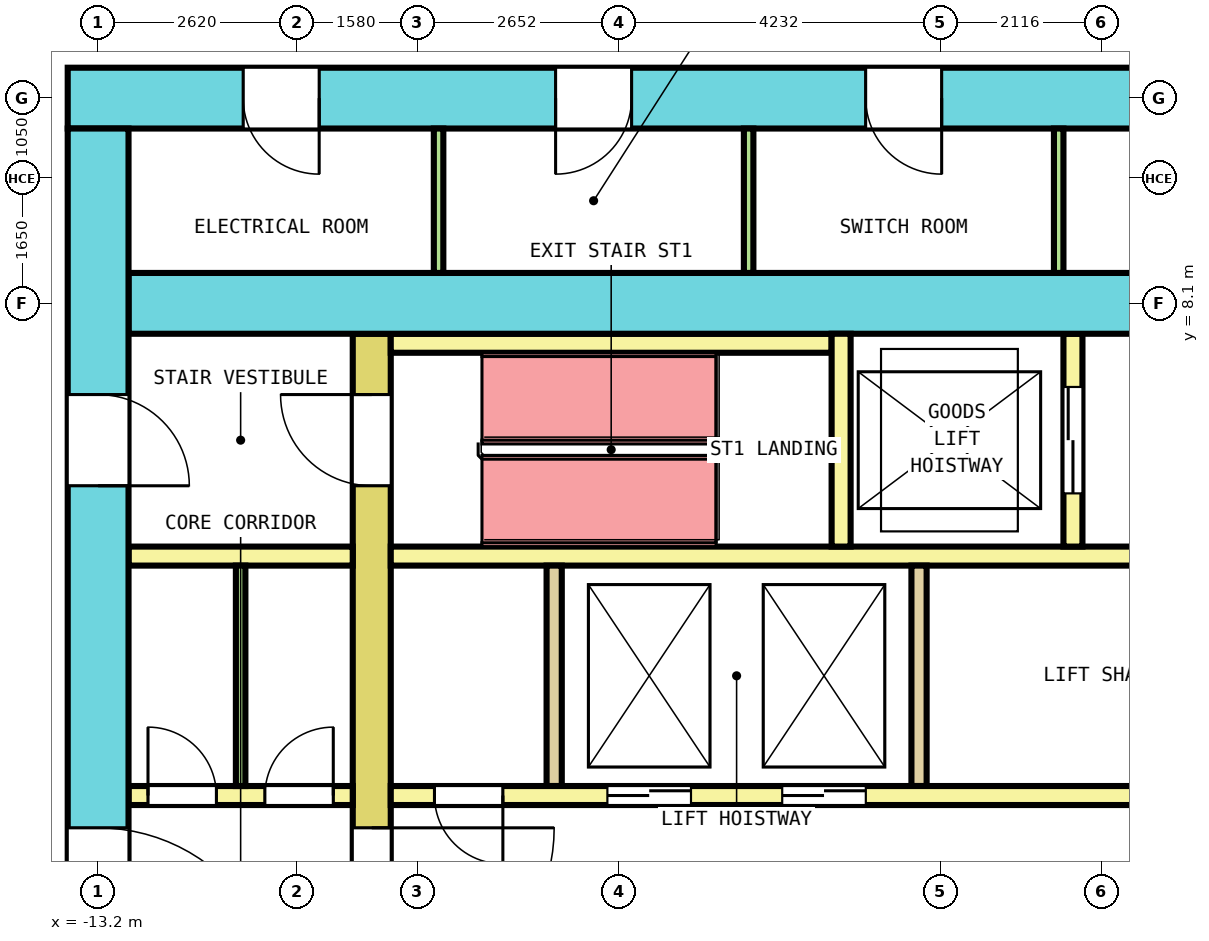
"""IFC4 building model, lengths in metres.
Left out: names, types, materials, properties, quantities, classifications, styles, units other than length and angle.
Written with IfcOpenShell. Run it as: python <this file> out.ifc"""

import sys

from ifc_helpers import new_model, si_unit, direction, frame, frame_2d, origin, place, context, subcontext, project, spatial, rectangle, extrude, element, fill, save


model = new_model("IFC4")
c1 = context("Model", 3, precision=1e-05, world=origin(), true_north=direction((0.0, 1.0)))
c2 = subcontext(c1, "Body", "Model", "MODEL_VIEW")
j1 = project(units=[si_unit("LENGTHUNIT", "METRE"), si_unit("PLANEANGLEUNIT", "RADIAN")], contexts=[c1])
p1 = place(None, origin())
s1 = spatial("IfcSite", under=j1, at=p1, CompositionType="ELEMENT")
p2 = place(p1, origin())
s2 = spatial("IfcBuilding", under=s1, at=p2, CompositionType="ELEMENT")
p3 = place(p2, frame((0.0, 0.0, 117.6)))
s3 = spatial("IfcBuildingStorey", under=s2, at=p3, CompositionType="ELEMENT", Elevation=117.6)
p4 = place(p3, frame((-13.6, 10.8, 0.0), z_axis=(0.0, 0.0, 1.0), x_axis=(1.0, 0.0, 0.0)))
e1 = element("IfcWall", 1, at=p4, inside=s3, PredefinedType="SHEAR", context=c2, shape_type="SweptSolid", body=[
    extrude(rectangle(XDim=27.2, YDim=0.8, at=frame_2d((13.6, 0.0))), origin(), (0.0, 0.0, 1.0), 4.1),
])
p5 = place(p4, frame((2.308, 0.0, 0.0)))
e2 = element("IfcOpeningElement", 2, at=p5, cuts=e1, PredefinedType="OPENING", context=c2, shape_type="SweptSolid", body=[
    extrude(rectangle(XDim=1.0, YDim=2.1, at=frame_2d((0.5, 1.05))), frame((0.0, 0.41, 0.0), z_axis=(0.0, -1.0, 0.0), x_axis=(1.0, 0.0, 0.0)), (0.0, 0.0, 1.0), 0.82),
])
p6 = place(p4, frame((6.419, 0.0, 0.0)))
e3 = element("IfcOpeningElement", 3, at=p6, cuts=e1, PredefinedType="OPENING", context=c2, shape_type="SweptSolid", body=[
    extrude(rectangle(XDim=1.0, YDim=2.1, at=frame_2d((0.5, 1.05))), frame((0.0, 0.41, 0.0), z_axis=(0.0, -1.0, 0.0), x_axis=(1.0, 0.0, 0.0)), (0.0, 0.0, 1.0), 0.82),
])
p7 = place(p4, frame((10.498, 0.0, 0.0)))
e4 = element("IfcOpeningElement", 4, at=p7, cuts=e1, PredefinedType="OPENING", context=c2, shape_type="SweptSolid", body=[
    extrude(rectangle(XDim=1.0, YDim=2.1, at=frame_2d((0.5, 1.05))), frame((0.0, 0.41, 0.0), z_axis=(0.0, -1.0, 0.0), x_axis=(1.0, 0.0, 0.0)), (0.0, 0.0, 1.0), 0.82),
])
p8 = place(p4, frame((18.035, 0.0, 0.0)))
e5 = element("IfcOpeningElement", 5, at=p8, cuts=e1, PredefinedType="OPENING", context=c2, shape_type="SweptSolid", body=[
    extrude(rectangle(XDim=1.0, YDim=2.1, at=frame_2d((0.5, 1.05))), frame((0.0, 0.41, 0.0), z_axis=(0.0, -1.0, 0.0), x_axis=(1.0, 0.0, 0.0)), (0.0, 0.0, 1.0), 0.82),
])
p9 = place(p4, frame((21.181, 0.0, 0.0)))
e6 = element("IfcOpeningElement", 6, at=p9, cuts=e1, PredefinedType="OPENING", context=c2, shape_type="SweptSolid", body=[
    extrude(rectangle(XDim=1.0, YDim=2.1, at=frame_2d((0.5, 1.05))), frame((0.0, 0.41, 0.0), z_axis=(0.0, -1.0, 0.0), x_axis=(1.0, 0.0, 0.0)), (0.0, 0.0, 1.0), 0.82),
])
p10 = place(p4, frame((24.358, 0.0, 0.0)))
e7 = element("IfcOpeningElement", 7, at=p10, cuts=e1, PredefinedType="OPENING", context=c2, shape_type="SweptSolid", body=[
    extrude(rectangle(XDim=1.0, YDim=2.1, at=frame_2d((0.5, 1.05))), frame((0.0, 0.41, 0.0), z_axis=(0.0, -1.0, 0.0), x_axis=(1.0, 0.0, 0.0)), (0.0, 0.0, 1.0), 0.82),
])
p11 = place(p4, frame((14.525, 0.0, 0.0)))
e8 = element("IfcOpeningElement", 8, at=p11, cuts=e1, PredefinedType="OPENING", context=c2, shape_type="SweptSolid", body=[
    extrude(rectangle(XDim=1.4, YDim=2.1, at=frame_2d((0.7, 1.05))), frame((0.0, 0.41, 0.0), z_axis=(0.0, -1.0, 0.0), x_axis=(1.0, 0.0, 0.0)), (0.0, 0.0, 1.0), 0.82),
])
p12 = place(p3, frame((-13.2, -10.4, 0.0), z_axis=(0.0, 0.0, 1.0), x_axis=(0.0, 1.0, 0.0)))
e9 = element("IfcWall", 9, at=p12, inside=s3, PredefinedType="SHEAR", context=c2, shape_type="SweptSolid", body=[
    extrude(rectangle(XDim=20.8, YDim=0.8, at=frame_2d((10.4, 0.0))), origin(), (0.0, 0.0, 1.0), 4.1),
])
p13 = place(p12, frame((9.2, 0.0, 0.0)))
e10 = element("IfcOpeningElement", 10, at=p13, cuts=e9, PredefinedType="OPENING", context=c2, shape_type="SweptSolid", body=[
    extrude(rectangle(XDim=2.4, YDim=2.1, at=frame_2d((1.2, 1.05))), frame((0.0, 0.41, 0.0), z_axis=(0.0, -1.0, 0.0), x_axis=(1.0, 0.0, 0.0)), (0.0, 0.0, 1.0), 0.82),
])
p14 = place(p12, frame((16.1, 0.0, 0.0)))
e11 = element("IfcOpeningElement", 11, at=p14, cuts=e9, PredefinedType="OPENING", context=c2, shape_type="SweptSolid", body=[
    extrude(rectangle(XDim=1.2, YDim=2.1, at=frame_2d((0.6, 1.05))), frame((0.0, 0.41, 0.0), z_axis=(0.0, -1.0, 0.0), x_axis=(1.0, 0.0, 0.0)), (0.0, 0.0, 1.0), 0.82),
])
p15 = place(p12, frame((3.5, 0.0, 0.0)))
e12 = element("IfcOpeningElement", 12, at=p15, cuts=e9, PredefinedType="OPENING", context=c2, shape_type="SweptSolid", body=[
    extrude(rectangle(XDim=1.2, YDim=2.1, at=frame_2d((0.6, 1.05))), frame((0.0, 0.41, 0.0), z_axis=(0.0, -1.0, 0.0), x_axis=(1.0, 0.0, 0.0)), (0.0, 0.0, 1.0), 0.82),
])
p16 = place(p3, frame((-12.8, 8.1, 0.0), z_axis=(0.0, 0.0, 1.0), x_axis=(1.0, 0.0, 0.0)))
e13 = element("IfcWall", 13, at=p16, inside=s3, PredefinedType="SHEAR", context=c2, shape_type="SweptSolid", body=[
    extrude(rectangle(XDim=25.6, YDim=0.8, at=frame_2d((12.8, 0.0))), origin(), (0.0, 0.0, 1.0), 4.1),
])
p17 = place(p16, frame((13.725, 0.0, 0.0)))
e14 = element("IfcOpeningElement", 14, at=p17, cuts=e13, PredefinedType="OPENING", context=c2, shape_type="SweptSolid", body=[
    extrude(rectangle(XDim=1.4, YDim=2.1, at=frame_2d((0.7, 1.05))), frame((0.0, 0.41, 0.0), z_axis=(0.0, -1.0, 0.0), x_axis=(1.0, 0.0, 0.0)), (0.0, 0.0, 1.0), 0.82),
])
p18 = place(p3, frame((-9.6, -7.7, 0.0), z_axis=(0.0, 0.0, 1.0), x_axis=(0.0, 1.0, 0.0)))
e15 = element("IfcWall", 15, at=p18, inside=s3, PredefinedType="SHEAR", context=c2, shape_type="SweptSolid", body=[
    extrude(rectangle(XDim=15.4, YDim=0.5, at=frame_2d((7.7, 0.0))), origin(), (0.0, 0.0, 1.0), 4.1),
])
p19 = place(p18, frame((6.5, 0.0, 0.0)))
e16 = element("IfcOpeningElement", 16, at=p19, cuts=e15, PredefinedType="OPENING", context=c2, shape_type="SweptSolid", body=[
    extrude(rectangle(XDim=2.4, YDim=2.1, at=frame_2d((1.2, 1.05))), frame((0.0, 0.26, 0.0), z_axis=(0.0, -1.0, 0.0), x_axis=(1.0, 0.0, 0.0)), (0.0, 0.0, 1.0), 0.52),
])
p20 = place(p18, frame((13.4, 0.0, 0.0)))
e17 = element("IfcOpeningElement", 17, at=p20, cuts=e15, PredefinedType="OPENING", context=c2, shape_type="SweptSolid", body=[
    extrude(rectangle(XDim=1.2, YDim=2.1, at=frame_2d((0.6, 1.05))), frame((0.0, 0.26, 0.0), z_axis=(0.0, -1.0, 0.0), x_axis=(1.0, 0.0, 0.0)), (0.0, 0.0, 1.0), 0.52),
])
p21 = place(p18, frame((0.8, 0.0, 0.0)))
e18 = element("IfcOpeningElement", 18, at=p21, cuts=e15, PredefinedType="OPENING", context=c2, shape_type="SweptSolid", body=[
    extrude(rectangle(XDim=1.2, YDim=2.1, at=frame_2d((0.6, 1.05))), frame((0.0, 0.26, 0.0), z_axis=(0.0, -1.0, 0.0), x_axis=(1.0, 0.0, 0.0)), (0.0, 0.0, 1.0), 0.52),
])
p22 = place(p3, frame((-12.8, 1.625, 0.0), z_axis=(0.0, 0.0, 1.0), x_axis=(1.0, 0.0, 0.0)))
e19 = element("IfcWall", 19, at=p22, inside=s3, PredefinedType="SOLIDWALL", context=c2, shape_type="SweptSolid", body=[
    extrude(rectangle(XDim=2.95, YDim=0.25, at=frame_2d((1.475, 0.0))), origin(), (0.0, 0.0, 1.0), 4.1),
])
p23 = place(p22, frame((0.256, 0.0, 0.0)))
e20 = element("IfcOpeningElement", 20, at=p23, cuts=e19, PredefinedType="OPENING", context=c2, shape_type="SweptSolid", body=[
    extrude(rectangle(XDim=0.9, YDim=2.1, at=frame_2d((0.45, 1.05))), frame((0.0, 0.135, 0.0), z_axis=(0.0, -1.0, 0.0), x_axis=(1.0, 0.0, 0.0)), (0.0, 0.0, 1.0), 0.27),
])
p24 = place(p22, frame((1.794, 0.0, 0.0)))
e21 = element("IfcOpeningElement", 21, at=p24, cuts=e19, PredefinedType="OPENING", context=c2, shape_type="SweptSolid", body=[
    extrude(rectangle(XDim=0.9, YDim=2.1, at=frame_2d((0.45, 1.05))), frame((0.0, 0.135, 0.0), z_axis=(0.0, -1.0, 0.0), x_axis=(1.0, 0.0, 0.0)), (0.0, 0.0, 1.0), 0.27),
])
p25 = place(p3, frame((-9.35, 1.625, 0.0), z_axis=(0.0, 0.0, 1.0), x_axis=(1.0, 0.0, 0.0)))
e22 = element("IfcWall", 22, at=p25, inside=s3, PredefinedType="SOLIDWALL", context=c2, shape_type="SweptSolid", body=[
    extrude(rectangle(XDim=18.7, YDim=0.25, at=frame_2d((9.35, 0.0))), origin(), (0.0, 0.0, 1.0), 4.1),
])
p26 = place(p25, frame((2.85, 0.0, 0.0)))
e23 = element("IfcOpeningElement", 23, at=p26, cuts=e22, PredefinedType="OPENING", context=c2, shape_type="SweptSolid", body=[
    extrude(rectangle(XDim=1.1, YDim=2.1, at=frame_2d((0.55, 1.05))), frame((0.0, 0.135, 0.0), z_axis=(0.0, -1.0, 0.0), x_axis=(1.0, 0.0, 0.0)), (0.0, 0.0, 1.0), 0.27),
])
p27 = place(p25, frame((5.15, 0.0, 0.0)))
e24 = element("IfcOpeningElement", 24, at=p27, cuts=e22, PredefinedType="OPENING", context=c2, shape_type="SweptSolid", body=[
    extrude(rectangle(XDim=1.1, YDim=2.1, at=frame_2d((0.55, 1.05))), frame((0.0, 0.135, 0.0), z_axis=(0.0, -1.0, 0.0), x_axis=(1.0, 0.0, 0.0)), (0.0, 0.0, 1.0), 0.27),
])
p28 = place(p25, frame((14.8, 0.0, 0.0)))
e25 = element("IfcOpeningElement", 25, at=p28, cuts=e22, PredefinedType="OPENING", context=c2, shape_type="SweptSolid", body=[
    extrude(rectangle(XDim=1.1, YDim=2.1, at=frame_2d((0.55, 1.05))), frame((0.0, 0.135, 0.0), z_axis=(0.0, -1.0, 0.0), x_axis=(1.0, 0.0, 0.0)), (0.0, 0.0, 1.0), 0.27),
])
p29 = place(p25, frame((0.575, 0.0, 0.0)))
e26 = element("IfcOpeningElement", 26, at=p29, cuts=e22, PredefinedType="OPENING", context=c2, shape_type="SweptSolid", body=[
    extrude(rectangle(XDim=0.9, YDim=2.1, at=frame_2d((0.45, 1.05))), frame((0.0, 0.135, 0.0), z_axis=(0.0, -1.0, 0.0), x_axis=(1.0, 0.0, 0.0)), (0.0, 0.0, 1.0), 0.27),
])
p30 = place(p25, frame((17.225, 0.0, 0.0)))
e27 = element("IfcOpeningElement", 27, at=p30, cuts=e22, PredefinedType="OPENING", context=c2, shape_type="SweptSolid", body=[
    extrude(rectangle(XDim=0.9, YDim=2.1, at=frame_2d((0.45, 1.05))), frame((0.0, 0.135, 0.0), z_axis=(0.0, -1.0, 0.0), x_axis=(1.0, 0.0, 0.0)), (0.0, 0.0, 1.0), 0.27),
])
p31 = place(p3, frame((-12.8, 4.775, 0.0), z_axis=(0.0, 0.0, 1.0), x_axis=(1.0, 0.0, 0.0)))
e28 = element("IfcWall", 28, at=p31, inside=s3, PredefinedType="SOLIDWALL", context=c2, shape_type="SweptSolid", body=[
    extrude(rectangle(XDim=2.95, YDim=0.25, at=frame_2d((1.475, 0.0))), origin(), (0.0, 0.0, 1.0), 4.1),
])
p32 = place(p3, frame((-9.35, 4.775, 0.0), z_axis=(0.0, 0.0, 1.0), x_axis=(1.0, 0.0, 0.0)))
e29 = element("IfcWall", 29, at=p32, inside=s3, PredefinedType="SOLIDWALL", context=c2, shape_type="SweptSolid", body=[
    extrude(rectangle(XDim=18.7, YDim=0.25, at=frame_2d((9.35, 0.0))), origin(), (0.0, 0.0, 1.0), 4.1),
])
for number, where, z_axis, x_axis in (
    (30, (-7.2, 1.75, 0.0), (0.0, 0.0, 1.0), (0.0, 1.0, 0.0)),
    (31, (-2.4, 1.75, 0.0), (0.0, 0.0, 1.0), (0.0, 1.0, 0.0)),
):
    element("IfcWall", number, at=place(p3, frame(where, z_axis=z_axis, x_axis=x_axis)), inside=s3, PredefinedType="SOLIDWALL", context=c2, shape_type="SweptSolid", body=[
        extrude(rectangle(XDim=2.9, YDim=0.2, at=frame_2d((1.45, 0.0))), origin(), (0.0, 0.0, 1.0), 4.1),
    ])
p33 = place(p3, frame((-9.35, 7.575, 0.0), z_axis=(0.0, 0.0, 1.0), x_axis=(1.0, 0.0, 0.0)))
e32 = element("IfcWall", 32, at=p33, inside=s3, PredefinedType="SOLIDWALL", context=c2, shape_type="SweptSolid", body=[
    extrude(rectangle(XDim=5.8, YDim=0.25, at=frame_2d((2.9, 0.0))), origin(), (0.0, 0.0, 1.0), 4.1),
])
p34 = place(p3, frame((-3.425, 4.9, 0.0), z_axis=(0.0, 0.0, 1.0), x_axis=(0.0, 1.0, 0.0)))
e33 = element("IfcWall", 33, at=p34, inside=s3, PredefinedType="SOLIDWALL", context=c2, shape_type="SweptSolid", body=[
    extrude(rectangle(XDim=2.8, YDim=0.25, at=frame_2d((1.4, 0.0))), origin(), (0.0, 0.0, 1.0), 4.1),
])
p35 = place(p3, frame((-0.375, 4.9, 0.0), z_axis=(0.0, 0.0, 1.0), x_axis=(0.0, 1.0, 0.0)))
e34 = element("IfcWall", 34, at=p35, inside=s3, PredefinedType="SOLIDWALL", context=c2, shape_type="SweptSolid", body=[
    extrude(rectangle(XDim=2.8, YDim=0.25, at=frame_2d((1.4, 0.0))), origin(), (0.0, 0.0, 1.0), 4.1),
])
p36 = place(p35, frame((0.7, 0.0, 0.0)))
e35 = element("IfcOpeningElement", 35, at=p36, cuts=e34, PredefinedType="OPENING", context=c2, shape_type="SweptSolid", body=[
    extrude(rectangle(XDim=1.4, YDim=2.1, at=frame_2d((0.7, 1.05))), frame((0.0, 0.135, 0.0), z_axis=(0.0, -1.0, 0.0), x_axis=(1.0, 0.0, 0.0)), (0.0, 0.0, 1.0), 0.27),
])
for number, where, z_axis, x_axis in (
    (36, (-8.721, 8.5, 0.0), (0.0, 0.0, 1.0), (0.0, 1.0, 0.0)),
    (37, (-4.642, 8.5, 0.0), (0.0, 0.0, 1.0), (0.0, 1.0, 0.0)),
    (38, (-0.562, 8.5, 0.0), (0.0, 0.0, 1.0), (0.0, 1.0, 0.0)),
):
    element("IfcWall", number, at=place(p3, frame(where, z_axis=z_axis, x_axis=x_axis)), inside=s3, PredefinedType="PARTITIONING", context=c2, shape_type="SweptSolid", body=[
        extrude(rectangle(XDim=1.9, YDim=0.125, at=frame_2d((0.95, 0.0))), origin(), (0.0, 0.0, 1.0), 3.05),
    ])
p37 = place(p3, frame((-11.325, 1.75, 0.0), z_axis=(0.0, 0.0, 1.0), x_axis=(0.0, 1.0, 0.0)))
e39 = element("IfcWall", 39, at=p37, inside=s3, PredefinedType="PARTITIONING", context=c2, shape_type="SweptSolid", body=[
    extrude(rectangle(XDim=2.9, YDim=0.125, at=frame_2d((1.45, 0.0))), origin(), (0.0, 0.0, 1.0), 4.1),
])
p38 = place(p26, origin())
e40 = element("IfcDoor", 40, at=p38, inside=s3, OperationType="DOUBLE_DOOR_SLIDING", PredefinedType="DOOR", context=c2, shape_type="SweptSolid", body=[
    extrude(rectangle(XDim=1.1, YDim=2.1, at=frame_2d((0.55, 1.05))), frame((0.0, 0.075, 0.0), z_axis=(0.0, -1.0, 0.0), x_axis=(1.0, 0.0, 0.0)), (0.0, 0.0, 1.0), 0.15),
])
fill(e23, e40)
p39 = place(p27, origin())
e41 = element("IfcDoor", 41, at=p39, inside=s3, OperationType="DOUBLE_DOOR_SLIDING", PredefinedType="DOOR", context=c2, shape_type="SweptSolid", body=[
    extrude(rectangle(XDim=1.1, YDim=2.1, at=frame_2d((0.55, 1.05))), frame((0.0, 0.075, 0.0), z_axis=(0.0, -1.0, 0.0), x_axis=(1.0, 0.0, 0.0)), (0.0, 0.0, 1.0), 0.15),
])
fill(e24, e41)
p40 = place(p36, origin())
e42 = element("IfcDoor", 42, at=p40, inside=s3, OperationType="DOUBLE_DOOR_SLIDING", PredefinedType="DOOR", context=c2, shape_type="SweptSolid", body=[
    extrude(rectangle(XDim=1.4, YDim=2.1, at=frame_2d((0.7, 1.05))), frame((0.0, 0.075, 0.0), z_axis=(0.0, -1.0, 0.0), x_axis=(1.0, 0.0, 0.0)), (0.0, 0.0, 1.0), 0.15),
])
fill(e35, e42)
p41 = place(p19, origin())
e43 = element("IfcDoor", 43, at=p41, inside=s3, OperationType="DOUBLE_DOOR_SINGLE_SWING", PredefinedType="DOOR", context=c2, shape_type="SweptSolid", body=[
    extrude(rectangle(XDim=2.4, YDim=2.1, at=frame_2d((1.2, 1.05))), frame((0.0, 0.2, 0.0), z_axis=(0.0, -1.0, 0.0), x_axis=(1.0, 0.0, 0.0)), (0.0, 0.0, 1.0), 0.4),
])
fill(e16, e43)
p42 = place(p13, origin())
e44 = element("IfcDoor", 44, at=p42, inside=s3, OperationType="DOUBLE_DOOR_SINGLE_SWING", PredefinedType="DOOR", context=c2, shape_type="SweptSolid", body=[
    extrude(rectangle(XDim=2.4, YDim=2.1, at=frame_2d((1.2, 1.05))), frame((0.0, 0.3, 0.0), z_axis=(0.0, -1.0, 0.0), x_axis=(1.0, 0.0, 0.0)), (0.0, 0.0, 1.0), 0.6),
])
fill(e10, e44)
p43 = place(p20, origin())
e45 = element("IfcDoor", 45, at=p43, inside=s3, OperationType="SINGLE_SWING_LEFT", PredefinedType="DOOR", context=c2, shape_type="SweptSolid", body=[
    extrude(rectangle(XDim=1.2, YDim=2.1, at=frame_2d((0.6, 1.05))), frame((0.0, 0.2, 0.0), z_axis=(0.0, -1.0, 0.0), x_axis=(1.0, 0.0, 0.0)), (0.0, 0.0, 1.0), 0.4),
])
fill(e17, e45)
p44 = place(p14, origin())
e46 = element("IfcDoor", 46, at=p44, inside=s3, OperationType="SINGLE_SWING_RIGHT", PredefinedType="DOOR", context=c2, shape_type="SweptSolid", body=[
    extrude(rectangle(XDim=1.2, YDim=2.1, at=frame_2d((0.6, 1.05))), frame((0.0, 0.3, 0.0), z_axis=(0.0, -1.0, 0.0), x_axis=(1.0, 0.0, 0.0)), (0.0, 0.0, 1.0), 0.6),
])
fill(e11, e46)
p45 = place(p5, origin())
e47 = element("IfcDoor", 47, at=p45, inside=s3, OperationType="SINGLE_SWING_LEFT", PredefinedType="DOOR", context=c2, shape_type="SweptSolid", body=[
    extrude(rectangle(XDim=1.0, YDim=2.1, at=frame_2d((0.5, 1.05))), frame((0.0, 0.3, 0.0), z_axis=(0.0, -1.0, 0.0), x_axis=(1.0, 0.0, 0.0)), (0.0, 0.0, 1.0), 0.6),
])
fill(e2, e47)
p46 = place(p6, origin())
e48 = element("IfcDoor", 48, at=p46, inside=s3, OperationType="SINGLE_SWING_RIGHT", PredefinedType="DOOR", context=c2, shape_type="SweptSolid", body=[
    extrude(rectangle(XDim=1.0, YDim=2.1, at=frame_2d((0.5, 1.05))), frame((0.0, 0.3, 0.0), z_axis=(0.0, -1.0, 0.0), x_axis=(1.0, 0.0, 0.0)), (0.0, 0.0, 1.0), 0.6),
])
fill(e3, e48)
p47 = place(p7, origin())
e49 = element("IfcDoor", 49, at=p47, inside=s3, OperationType="SINGLE_SWING_LEFT", PredefinedType="DOOR", context=c2, shape_type="SweptSolid", body=[
    extrude(rectangle(XDim=1.0, YDim=2.1, at=frame_2d((0.5, 1.05))), frame((0.0, 0.3, 0.0), z_axis=(0.0, -1.0, 0.0), x_axis=(1.0, 0.0, 0.0)), (0.0, 0.0, 1.0), 0.6),
])
fill(e4, e49)
p48 = place(p23, origin())
e50 = element("IfcDoor", 50, at=p48, inside=s3, OperationType="SINGLE_SWING_RIGHT", PredefinedType="DOOR", context=c2, shape_type="SweptSolid", body=[
    extrude(rectangle(XDim=0.9, YDim=2.1, at=frame_2d((0.45, 1.05))), frame((0.0, 0.075, 0.0), z_axis=(0.0, -1.0, 0.0), x_axis=(1.0, 0.0, 0.0)), (0.0, 0.0, 1.0), 0.15),
])
fill(e20, e50)
p49 = place(p24, origin())
e51 = element("IfcDoor", 51, at=p49, inside=s3, OperationType="SINGLE_SWING_LEFT", PredefinedType="DOOR", context=c2, shape_type="SweptSolid", body=[
    extrude(rectangle(XDim=0.9, YDim=2.1, at=frame_2d((0.45, 1.05))), frame((0.0, 0.075, 0.0), z_axis=(0.0, -1.0, 0.0), x_axis=(1.0, 0.0, 0.0)), (0.0, 0.0, 1.0), 0.15),
])
fill(e21, e51)
p50 = place(p29, origin())
e52 = element("IfcDoor", 52, at=p50, inside=s3, OperationType="SINGLE_SWING_RIGHT", PredefinedType="DOOR", context=c2, shape_type="SweptSolid", body=[
    extrude(rectangle(XDim=0.9, YDim=2.1, at=frame_2d((0.45, 1.05))), frame((0.0, 0.075, 0.0), z_axis=(0.0, -1.0, 0.0), x_axis=(1.0, 0.0, 0.0)), (0.0, 0.0, 1.0), 0.15),
])
fill(e26, e52)
save(model, sys.argv[1])
